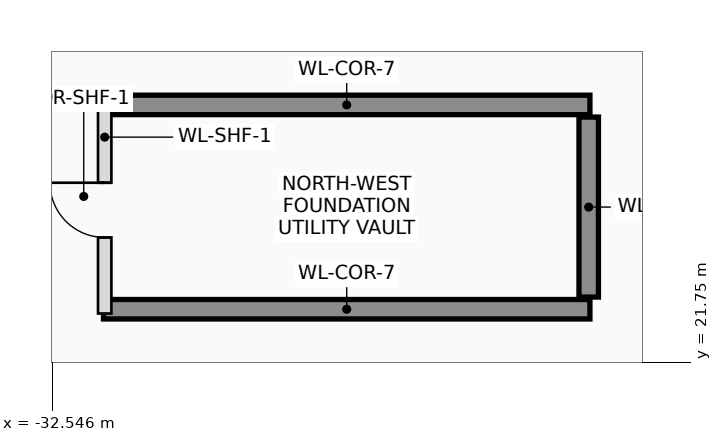
"""IFC4 building model, lengths in metres.
Left out: names, types, materials, properties, quantities, classifications, styles, units other than length and angle.
Written with IfcOpenShell. Run it as: python <this file> out.ifc"""

import sys

from ifc_helpers import new_model, si_unit, direction, frame, frame_2d, origin, place, context, subcontext, project, spatial, rectangle, extrude, element, fill, save


model = new_model("IFC4")
c1 = context("Model", 3, precision=1e-05, world=origin(), true_north=direction((0.0, 1.0)))
c2 = subcontext(c1, "Body", "Model", "MODEL_VIEW")
j1 = project(units=[si_unit("LENGTHUNIT", "METRE"), si_unit("PLANEANGLEUNIT", "RADIAN")], contexts=[c1])
p1 = place(None, origin())
s1 = spatial("IfcSite", under=j1, at=p1, CompositionType="ELEMENT")
p2 = place(p1, origin())
s2 = spatial("IfcBuilding", under=s1, at=p2, CompositionType="ELEMENT")
p3 = place(p2, frame((0.0, 0.0, -4.8)))
s3 = spatial("IfcBuildingStorey", under=s2, at=p3, CompositionType="ELEMENT", Elevation=-4.8)
for number, where, z_axis, x_axis in (
    (1, (-31.7, 25.98, 0.0), (0.0, 0.0, 1.0), (1.0, 0.0, 0.0)),
    (2, (-31.7, 22.62, 0.0), (0.0, 0.0, 1.0), (1.0, 0.0, 0.0)),
):
    element("IfcWall", number, at=place(p3, frame(where, z_axis=z_axis, x_axis=x_axis)), inside=s3, PredefinedType="SHEAR", context=c2, shape_type="SweptSolid", body=[
        extrude(rectangle(XDim=8.0, YDim=0.32, at=frame_2d((4.0, 0.0))), origin(), (0.0, 0.0, 1.0), 4.8),
    ])
p4 = place(p3, frame((-23.72, 22.82, 0.0), z_axis=(0.0, 0.0, 1.0), x_axis=(0.0, 1.0, 0.0)))
e3 = element("IfcWall", 3, at=p4, inside=s3, PredefinedType="SHEAR", context=c2, shape_type="SweptSolid", body=[
    extrude(rectangle(XDim=2.96, YDim=0.32, at=frame_2d((1.48, 0.0))), origin(), (0.0, 0.0, 1.0), 4.8),
])
p5 = place(p3, frame((-31.68, 22.55, 0.0), z_axis=(0.0, 0.0, 1.0), x_axis=(0.0, 1.0, 0.0)))
e4 = element("IfcWall", 4, at=p5, inside=s3, PredefinedType="PLUMBINGWALL", context=c2, shape_type="SweptSolid", body=[
    extrude(rectangle(XDim=3.5, YDim=0.22, at=frame_2d((1.75, 0.0))), origin(), (0.0, 0.0, 1.0), 4.54),
])
p6 = place(p5, frame((1.25, 0.0, 0.0)))
e5 = element("IfcOpeningElement", 5, at=p6, cuts=e4, PredefinedType="OPENING", context=c2, shape_type="SweptSolid", body=[
    extrude(rectangle(XDim=0.9, YDim=2.05, at=frame_2d((0.45, 1.025))), frame((0.0, 0.12, 0.0), z_axis=(0.0, -1.0, 0.0), x_axis=(1.0, 0.0, 0.0)), (0.0, 0.0, 1.0), 0.24),
])
p7 = place(p6, origin())
e6 = element("IfcDoor", 6, at=p7, inside=s3, OperationType="SINGLE_SWING_RIGHT", PredefinedType="DOOR", context=c2, shape_type="SweptSolid", body=[
    extrude(rectangle(XDim=0.9, YDim=2.05, at=frame_2d((0.45, 1.025))), frame((0.0, 0.025, 0.0), z_axis=(0.0, -1.0, 0.0), x_axis=(1.0, 0.0, 0.0)), (0.0, 0.0, 1.0), 0.05),
])
fill(e5, e6)
save(model, sys.argv[1])
